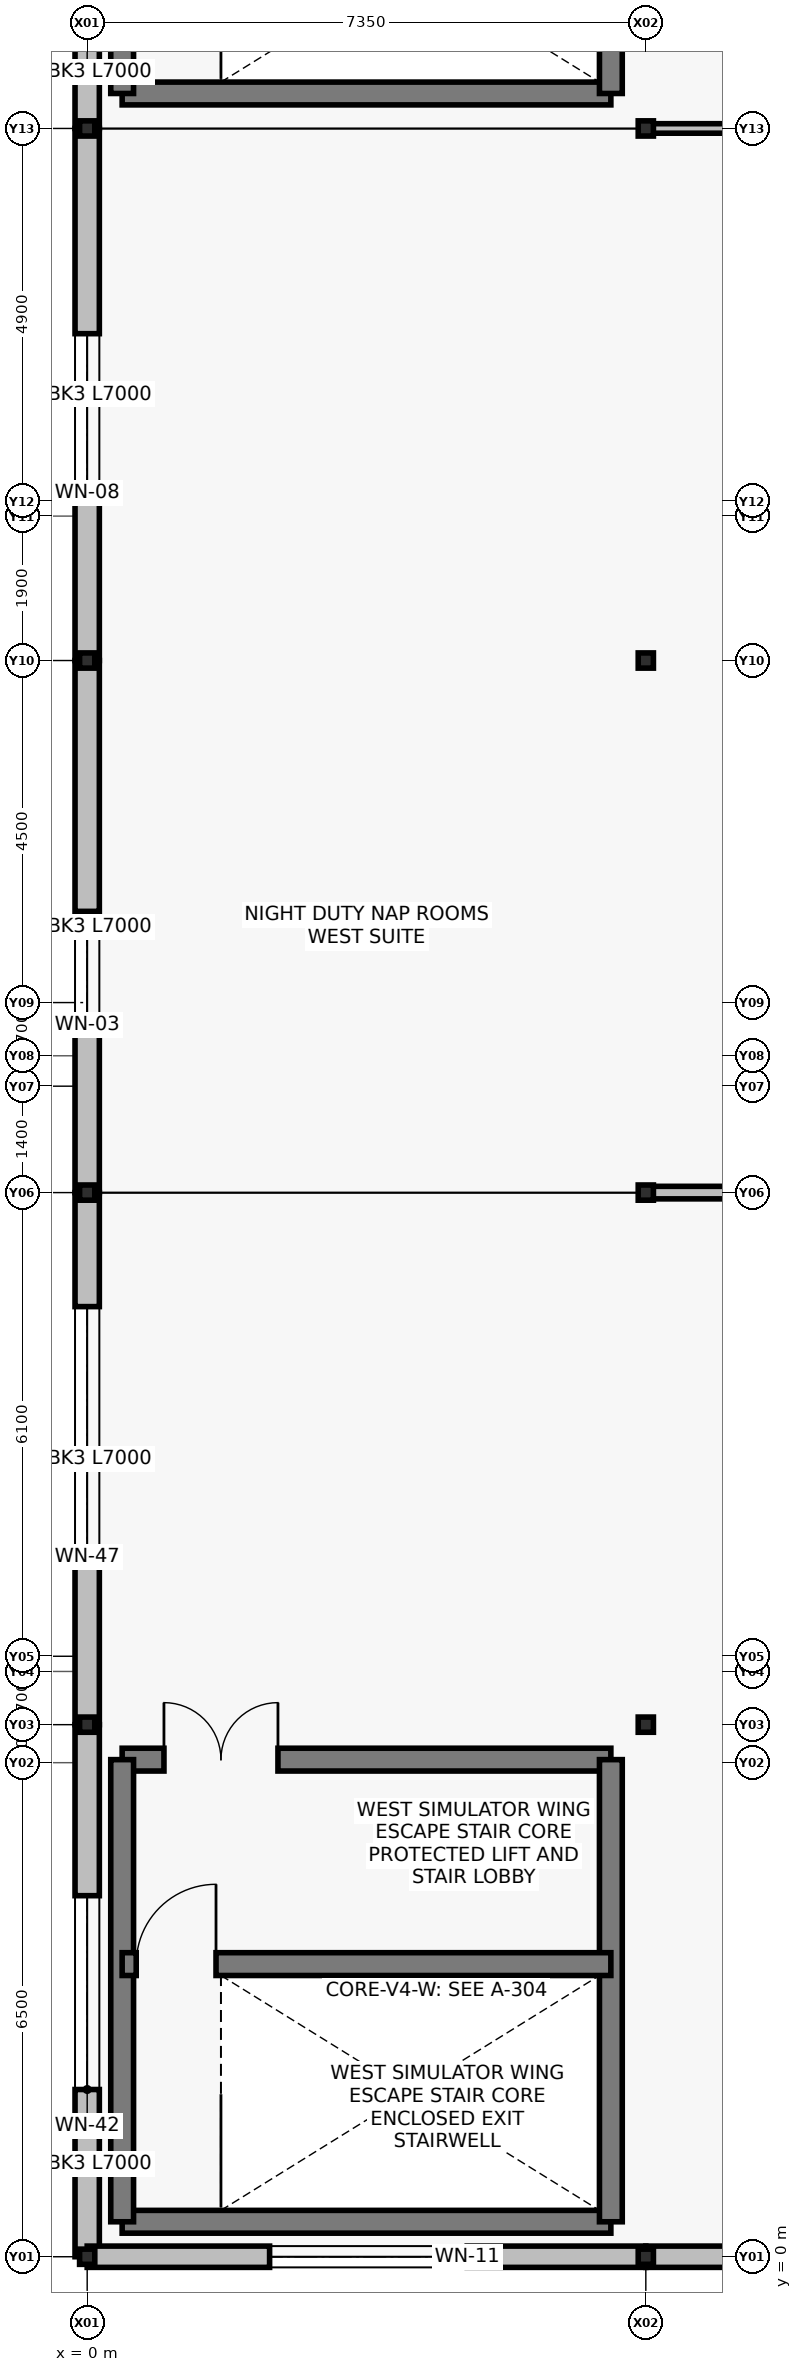
"""IFC4 building model, lengths in metres.
Left out: names, types, materials, properties, quantities, classifications, styles, units other than length and angle.
Written with IfcOpenShell. Run it as: python <this file> out.ifc"""

import sys

from ifc_helpers import new_model, si_unit, direction, frame, frame_2d, origin, origin_with_axes, origin_2d, place, context, subcontext, project, spatial, rectangle, i_section, extrude, element, fill, save


model = new_model("IFC4")
c1 = context("Model", 3, precision=1e-05, world=origin(), true_north=direction((0.0, 1.0)))
c2 = subcontext(c1, "Body", "Model", "MODEL_VIEW")
j1 = project(units=[si_unit("LENGTHUNIT", "METRE"), si_unit("PLANEANGLEUNIT", "RADIAN")], contexts=[c1])
p1 = place(None, origin())
s1 = spatial("IfcSite", under=j1, at=p1, CompositionType="ELEMENT")
p2 = place(p1, origin())
s2 = spatial("IfcBuilding", under=s1, at=p2, CompositionType="ELEMENT")
p3 = place(p2, frame((0.0, 0.0, 19.5)))
s3 = spatial("IfcBuildingStorey", under=s2, at=p3, CompositionType="ELEMENT", Elevation=19.5)
for number, where, z_axis, x_axis in (
    (1, (0.0, 0.0, 0.0), (0.0, 0.0, 1.0), (1.0, 0.0, 0.0)),
    (2, (0.0, 7.0, 0.0), (0.0, 0.0, 1.0), (1.0, 0.0, 0.0)),
    (3, (0.0, 14.0, 0.0), (0.0, 0.0, 1.0), (1.0, 0.0, 0.0)),
    (4, (0.0, 21.0, 0.0), (0.0, 0.0, 1.0), (1.0, 0.0, 0.0)),
    (5, (0.0, 28.0, 0.0), (0.0, 0.0, 1.0), (1.0, 0.0, 0.0)),
    (6, (7.35, 0.0, 0.0), (0.0, 0.0, 1.0), (1.0, 0.0, 0.0)),
    (7, (7.35, 7.0, 0.0), (0.0, 0.0, 1.0), (1.0, 0.0, 0.0)),
    (8, (7.35, 14.0, 0.0), (0.0, 0.0, 1.0), (1.0, 0.0, 0.0)),
    (9, (7.35, 21.0, 0.0), (0.0, 0.0, 1.0), (1.0, 0.0, 0.0)),
    (10, (7.35, 28.0, 0.0), (0.0, 0.0, 1.0), (1.0, 0.0, 0.0)),
):
    element("IfcColumn", number, at=place(p3, frame(where, z_axis=z_axis, x_axis=x_axis)), inside=s3, PredefinedType="COLUMN", context=c2, shape_type="SweptSolid", body=[
        extrude(i_section(OverallWidth=0.2, OverallDepth=0.2, WebThickness=0.008, FlangeThickness=0.012, at=origin_2d()), origin(), (0.0, 0.0, 1.0), 4.2),
    ])
p4 = place(p3, frame((0.0, 0.0, 0.0), z_axis=(0.0, 0.0, 1.0), x_axis=(0.0, 1.0, 0.0)))
e11 = element("IfcWall", 11, at=p4, inside=s3, PredefinedType="SOLIDWALL", context=c2, shape_type="SweptSolid", body=[
    extrude(rectangle(XDim=7.0, YDim=0.32, at=frame_2d((3.5, 0.0))), origin(), (0.0, 0.0, 1.0), 3.48),
])
p5 = place(p4, frame((2.2, 0.0, 0.9)))
e12 = element("IfcOpeningElement", 12, at=p5, cuts=e11, PredefinedType="OPENING", context=c2, shape_type="SweptSolid", body=[
    extrude(rectangle(XDim=2.55, YDim=1.75, at=frame_2d((1.275, 0.875))), frame((0.0, 0.17, 0.0), z_axis=(0.0, -1.0, 0.0), x_axis=(1.0, 0.0, 0.0)), (0.0, 0.0, 1.0), 0.34),
])
p6 = place(p3, frame((0.0, 7.0, 0.0), z_axis=(0.0, 0.0, 1.0), x_axis=(0.0, 1.0, 0.0)))
e13 = element("IfcWall", 13, at=p6, inside=s3, PredefinedType="SOLIDWALL", context=c2, shape_type="SweptSolid", body=[
    extrude(rectangle(XDim=7.0, YDim=0.32, at=frame_2d((3.5, 0.0))), origin(), (0.0, 0.0, 1.0), 3.48),
])
p7 = place(p6, frame((2.2, 0.0, 0.9)))
e14 = element("IfcOpeningElement", 14, at=p7, cuts=e13, PredefinedType="OPENING", context=c2, shape_type="SweptSolid", body=[
    extrude(rectangle(XDim=3.3, YDim=2.1, at=frame_2d((1.65, 1.05))), frame((0.0, 0.17, 0.0), z_axis=(0.0, -1.0, 0.0), x_axis=(1.0, 0.0, 0.0)), (0.0, 0.0, 1.0), 0.34),
])
p8 = place(p3, frame((0.0, 14.0, 0.0), z_axis=(0.0, 0.0, 1.0), x_axis=(0.0, 1.0, 0.0)))
e15 = element("IfcWall", 15, at=p8, inside=s3, PredefinedType="SOLIDWALL", context=c2, shape_type="SweptSolid", body=[
    extrude(rectangle(XDim=7.0, YDim=0.32, at=frame_2d((3.5, 0.0))), origin(), (0.0, 0.0, 1.0), 3.48),
])
p9 = place(p8, frame((2.2, 0.0, 0.9)))
e16 = element("IfcOpeningElement", 16, at=p9, cuts=e15, PredefinedType="OPENING", context=c2, shape_type="SweptSolid", body=[
    extrude(rectangle(XDim=1.5, YDim=1.8, at=frame_2d((0.75, 0.9))), frame((0.0, 0.17, 0.0), z_axis=(0.0, -1.0, 0.0), x_axis=(1.0, 0.0, 0.0)), (0.0, 0.0, 1.0), 0.34),
])
p10 = place(p3, frame((0.0, 21.0, 0.0), z_axis=(0.0, 0.0, 1.0), x_axis=(0.0, 1.0, 0.0)))
e17 = element("IfcWall", 17, at=p10, inside=s3, PredefinedType="SOLIDWALL", context=c2, shape_type="SweptSolid", body=[
    extrude(rectangle(XDim=7.0, YDim=0.32, at=frame_2d((3.5, 0.0))), origin(), (0.0, 0.0, 1.0), 3.48),
])
p11 = place(p10, frame((2.2, 0.0, 0.9)))
e18 = element("IfcOpeningElement", 18, at=p11, cuts=e17, PredefinedType="OPENING", context=c2, shape_type="SweptSolid", body=[
    extrude(rectangle(XDim=2.1, YDim=2.1, at=frame_2d((1.05, 1.05))), frame((0.0, 0.17, 0.0), z_axis=(0.0, -1.0, 0.0), x_axis=(1.0, 0.0, 0.0)), (0.0, 0.0, 1.0), 0.34),
])
p12 = place(p3, frame((0.0, 28.0, 0.0), z_axis=(0.0, 0.0, 1.0), x_axis=(0.0, 1.0, 0.0)))
e19 = element("IfcWall", 19, at=p12, inside=s3, PredefinedType="SOLIDWALL", context=c2, shape_type="SweptSolid", body=[
    extrude(rectangle(XDim=7.0, YDim=0.32, at=frame_2d((3.5, 0.0))), origin(), (0.0, 0.0, 1.0), 3.48),
])
p13 = place(p12, frame((2.2, 0.0, 0.9)))
e20 = element("IfcOpeningElement", 20, at=p13, cuts=e19, PredefinedType="OPENING", context=c2, shape_type="SweptSolid", body=[
    extrude(rectangle(XDim=3.0, YDim=1.8, at=frame_2d((1.5, 0.9))), frame((0.0, 0.17, 0.0), z_axis=(0.0, -1.0, 0.0), x_axis=(1.0, 0.0, 0.0)), (0.0, 0.0, 1.0), 0.34),
])
p14 = place(p3, origin_with_axes())
e21 = element("IfcWall", 21, at=p14, inside=s3, PredefinedType="SOLIDWALL", context=c2, shape_type="SweptSolid", body=[
    extrude(rectangle(XDim=7.35, YDim=0.28, at=frame_2d((3.675, 0.0))), origin(), (0.0, 0.0, 1.0), 3.48),
])
p15 = place(p14, frame((2.4, 0.0, 0.9)))
e22 = element("IfcOpeningElement", 22, at=p15, cuts=e21, PredefinedType="OPENING", context=c2, shape_type="SweptSolid", body=[
    extrude(rectangle(XDim=2.6, YDim=2.0, at=frame_2d((1.3, 1.0))), frame((0.0, 0.15, 0.0), z_axis=(0.0, -1.0, 0.0), x_axis=(1.0, 0.0, 0.0)), (0.0, 0.0, 1.0), 0.3),
])
p16 = place(p3, frame((7.35, 0.0, 0.0), z_axis=(0.0, 0.0, 1.0), x_axis=(1.0, 0.0, 0.0)))
e23 = element("IfcWall", 23, at=p16, inside=s3, PredefinedType="SOLIDWALL", context=c2, shape_type="SweptSolid", body=[
    extrude(rectangle(XDim=7.35, YDim=0.28, at=frame_2d((3.675, 0.0))), origin(), (0.0, 0.0, 1.0), 3.48),
])
p17 = place(p16, frame((2.4, 0.0, 0.9)))
e24 = element("IfcOpeningElement", 24, at=p17, cuts=e23, PredefinedType="OPENING", context=c2, shape_type="SweptSolid", body=[
    extrude(rectangle(XDim=2.8, YDim=2.1, at=frame_2d((1.4, 1.05))), frame((0.0, 0.15, 0.0), z_axis=(0.0, -1.0, 0.0), x_axis=(1.0, 0.0, 0.0)), (0.0, 0.0, 1.0), 0.3),
])
p18 = place(p3, frame((0.46, 28.46, 0.0), z_axis=(0.0, 0.0, 1.0), x_axis=(1.0, 0.0, 0.0)))
e25 = element("IfcWall", 25, at=p18, inside=s3, PredefinedType="SHEAR", context=c2, shape_type="SweptSolid", body=[
    extrude(rectangle(XDim=6.43, YDim=0.3, at=frame_2d((3.215, 0.0))), origin(), (0.0, 0.0, 1.0), 3.92),
])
for number, where, z_axis, x_axis in (
    (26, (0.46, 28.46, 0.0), (0.0, 0.0, 1.0), (0.0, 1.0, 0.0)),
    (27, (6.89, 28.46, 0.0), (0.0, 0.0, 1.0), (0.0, 1.0, 0.0)),
):
    element("IfcWall", number, at=place(p3, frame(where, z_axis=z_axis, x_axis=x_axis)), inside=s3, PredefinedType="SHEAR", context=c2, shape_type="SweptSolid", body=[
        extrude(rectangle(XDim=6.08, YDim=0.3, at=frame_2d((3.04, 0.0))), origin(), (0.0, 0.0, 1.0), 3.92),
    ])
p19 = place(p3, frame((0.46, 0.46, 0.0), z_axis=(0.0, 0.0, 1.0), x_axis=(1.0, 0.0, 0.0)))
e28 = element("IfcWall", 28, at=p19, inside=s3, PredefinedType="SHEAR", context=c2, shape_type="SweptSolid", body=[
    extrude(rectangle(XDim=6.43, YDim=0.3, at=frame_2d((3.215, 0.0))), origin(), (0.0, 0.0, 1.0), 3.92),
])
p20 = place(p3, frame((0.46, 6.54, 0.0), z_axis=(0.0, 0.0, 1.0), x_axis=(1.0, 0.0, 0.0)))
e29 = element("IfcWall", 29, at=p20, inside=s3, PredefinedType="SHEAR", context=c2, shape_type="SweptSolid", body=[
    extrude(rectangle(XDim=6.43, YDim=0.3, at=frame_2d((3.215, 0.0))), origin(), (0.0, 0.0, 1.0), 3.92),
])
p21 = place(p20, frame((0.55, 0.0, 0.0)))
e30 = element("IfcOpeningElement", 30, at=p21, cuts=e29, PredefinedType="OPENING", context=c2, shape_type="SweptSolid", body=[
    extrude(rectangle(XDim=1.5, YDim=2.2, at=frame_2d((0.75, 1.1))), frame((0.0, 0.16, 0.0), z_axis=(0.0, -1.0, 0.0), x_axis=(1.0, 0.0, 0.0)), (0.0, 0.0, 1.0), 0.32),
])
for number, where, z_axis, x_axis in (
    (31, (0.46, 0.46, 0.0), (0.0, 0.0, 1.0), (0.0, 1.0, 0.0)),
    (32, (6.89, 0.46, 0.0), (0.0, 0.0, 1.0), (0.0, 1.0, 0.0)),
):
    element("IfcWall", number, at=place(p3, frame(where, z_axis=z_axis, x_axis=x_axis)), inside=s3, PredefinedType="SHEAR", context=c2, shape_type="SweptSolid", body=[
        extrude(rectangle(XDim=6.08, YDim=0.3, at=frame_2d((3.04, 0.0))), origin(), (0.0, 0.0, 1.0), 3.92),
    ])
p22 = place(p3, frame((0.46, 3.85, 0.0), z_axis=(0.0, 0.0, 1.0), x_axis=(1.0, 0.0, 0.0)))
e33 = element("IfcWall", 33, at=p22, inside=s3, PredefinedType="SHEAR", context=c2, shape_type="SweptSolid", body=[
    extrude(rectangle(XDim=6.43, YDim=0.3, at=frame_2d((3.215, 0.0))), origin(), (0.0, 0.0, 1.0), 3.92),
])
p23 = place(p22, frame((0.185, 0.0, 0.0)))
e34 = element("IfcOpeningElement", 34, at=p23, cuts=e33, PredefinedType="OPENING", context=c2, shape_type="SweptSolid", body=[
    extrude(rectangle(XDim=1.05, YDim=2.15, at=frame_2d((0.525, 1.075))), frame((0.0, 0.16, 0.0), z_axis=(0.0, -1.0, 0.0), x_axis=(1.0, 0.0, 0.0)), (0.0, 0.0, 1.0), 0.32),
])
p24 = place(p3, frame((7.35, 14.0, 0.0), z_axis=(0.0, 0.0, 1.0), x_axis=(1.0, 0.0, 0.0)))
e35 = element("IfcWall", 35, at=p24, inside=s3, PredefinedType="PARTITIONING", context=c2, shape_type="SweptSolid", body=[
    extrude(rectangle(XDim=14.7, YDim=0.165, at=frame_2d((7.35, 0.0))), origin(), (0.0, 0.0, 1.0), 3.25),
])
p25 = place(p24, frame((4.0, 0.0, 0.0)))
e36 = element("IfcOpeningElement", 36, at=p25, cuts=e35, PredefinedType="OPENING", context=c2, shape_type="SweptSolid", body=[
    extrude(rectangle(XDim=1.05, YDim=2.1, at=frame_2d((0.525, 1.05))), frame((0.0, 0.092, 0.0), z_axis=(0.0, -1.0, 0.0), x_axis=(1.0, 0.0, 0.0)), (0.0, 0.0, 1.0), 0.185),
])
p26 = place(p3, frame((7.35, 28.0, 0.0), z_axis=(0.0, 0.0, 1.0), x_axis=(1.0, 0.0, 0.0)))
e37 = element("IfcWall", 37, at=p26, inside=s3, PredefinedType="PARTITIONING", context=c2, shape_type="SweptSolid", body=[
    extrude(rectangle(XDim=22.05, YDim=0.125, at=frame_2d((11.025, 0.0))), origin(), (0.0, 0.0, 1.0), 3.25),
])
p27 = place(p26, frame((4.0, 0.0, 0.0)))
e38 = element("IfcOpeningElement", 38, at=p27, cuts=e37, PredefinedType="OPENING", context=c2, shape_type="SweptSolid", body=[
    extrude(rectangle(XDim=1.35, YDim=2.2, at=frame_2d((0.675, 1.1))), frame((0.0, 0.072, 0.0), z_axis=(0.0, -1.0, 0.0), x_axis=(1.0, 0.0, 0.0)), (0.0, 0.0, 1.0), 0.145),
])
p28 = place(p26, frame((17.5, 0.0, 0.0)))
e39 = element("IfcOpeningElement", 39, at=p28, cuts=e37, PredefinedType="OPENING", context=c2, shape_type="SweptSolid", body=[
    extrude(rectangle(XDim=1.0, YDim=2.2, at=frame_2d((0.5, 1.1))), frame((0.0, 0.072, 0.0), z_axis=(0.0, -1.0, 0.0), x_axis=(1.0, 0.0, 0.0)), (0.0, 0.0, 1.0), 0.145),
])
p29 = place(p5, origin())
e40 = element("IfcWindow", 40, at=p29, inside=s3, PartitioningType="SINGLE_PANEL", PredefinedType="WINDOW", context=c2, shape_type="SweptSolid", body=[
    extrude(rectangle(XDim=2.55, YDim=1.75, at=frame_2d((1.275, 0.875))), frame((0.0, 0.03, 0.0), z_axis=(0.0, -1.0, 0.0), x_axis=(1.0, 0.0, 0.0)), (0.0, 0.0, 1.0), 0.06),
])
fill(e12, e40)
p30 = place(p7, origin())
e41 = element("IfcWindow", 41, at=p30, inside=s3, PartitioningType="SINGLE_PANEL", PredefinedType="WINDOW", context=c2, shape_type="SweptSolid", body=[
    extrude(rectangle(XDim=3.3, YDim=2.1, at=frame_2d((1.65, 1.05))), frame((0.0, 0.03, 0.0), z_axis=(0.0, -1.0, 0.0), x_axis=(1.0, 0.0, 0.0)), (0.0, 0.0, 1.0), 0.06),
])
fill(e14, e41)
p31 = place(p9, origin())
e42 = element("IfcWindow", 42, at=p31, inside=s3, PartitioningType="SINGLE_PANEL", PredefinedType="WINDOW", context=c2, shape_type="SweptSolid", body=[
    extrude(rectangle(XDim=1.5, YDim=1.8, at=frame_2d((0.75, 0.9))), frame((0.0, 0.03, 0.0), z_axis=(0.0, -1.0, 0.0), x_axis=(1.0, 0.0, 0.0)), (0.0, 0.0, 1.0), 0.06),
])
fill(e16, e42)
p32 = place(p11, origin())
e43 = element("IfcWindow", 43, at=p32, inside=s3, PartitioningType="SINGLE_PANEL", PredefinedType="WINDOW", context=c2, shape_type="SweptSolid", body=[
    extrude(rectangle(XDim=2.1, YDim=2.1, at=frame_2d((1.05, 1.05))), frame((0.0, 0.03, 0.0), z_axis=(0.0, -1.0, 0.0), x_axis=(1.0, 0.0, 0.0)), (0.0, 0.0, 1.0), 0.06),
])
fill(e18, e43)
p33 = place(p15, origin())
e44 = element("IfcWindow", 44, at=p33, inside=s3, PartitioningType="SINGLE_PANEL", PredefinedType="WINDOW", context=c2, shape_type="SweptSolid", body=[
    extrude(rectangle(XDim=2.6, YDim=2.0, at=frame_2d((1.3, 1.0))), frame((0.0, 0.03, 0.0), z_axis=(0.0, -1.0, 0.0), x_axis=(1.0, 0.0, 0.0)), (0.0, 0.0, 1.0), 0.06),
])
fill(e22, e44)
p34 = place(p23, origin())
e45 = element("IfcDoor", 45, at=p34, inside=s3, OperationType="SINGLE_SWING_RIGHT", PredefinedType="DOOR", context=c2, shape_type="SweptSolid", body=[
    extrude(rectangle(XDim=1.05, YDim=2.15, at=frame_2d((0.525, 1.075))), frame((0.0, 0.025, 0.0), z_axis=(0.0, -1.0, 0.0), x_axis=(1.0, 0.0, 0.0)), (0.0, 0.0, 1.0), 0.05),
])
fill(e34, e45)
p35 = place(p21, origin())
e46 = element("IfcDoor", 46, at=p35, inside=s3, OperationType="DOUBLE_DOOR_SINGLE_SWING", PredefinedType="DOOR", context=c2, shape_type="SweptSolid", body=[
    extrude(rectangle(XDim=1.5, YDim=2.2, at=frame_2d((0.75, 1.1))), frame((0.0, 0.025, 0.0), z_axis=(0.0, -1.0, 0.0), x_axis=(1.0, 0.0, 0.0)), (0.0, 0.0, 1.0), 0.05),
])
fill(e30, e46)
save(model, sys.argv[1])
